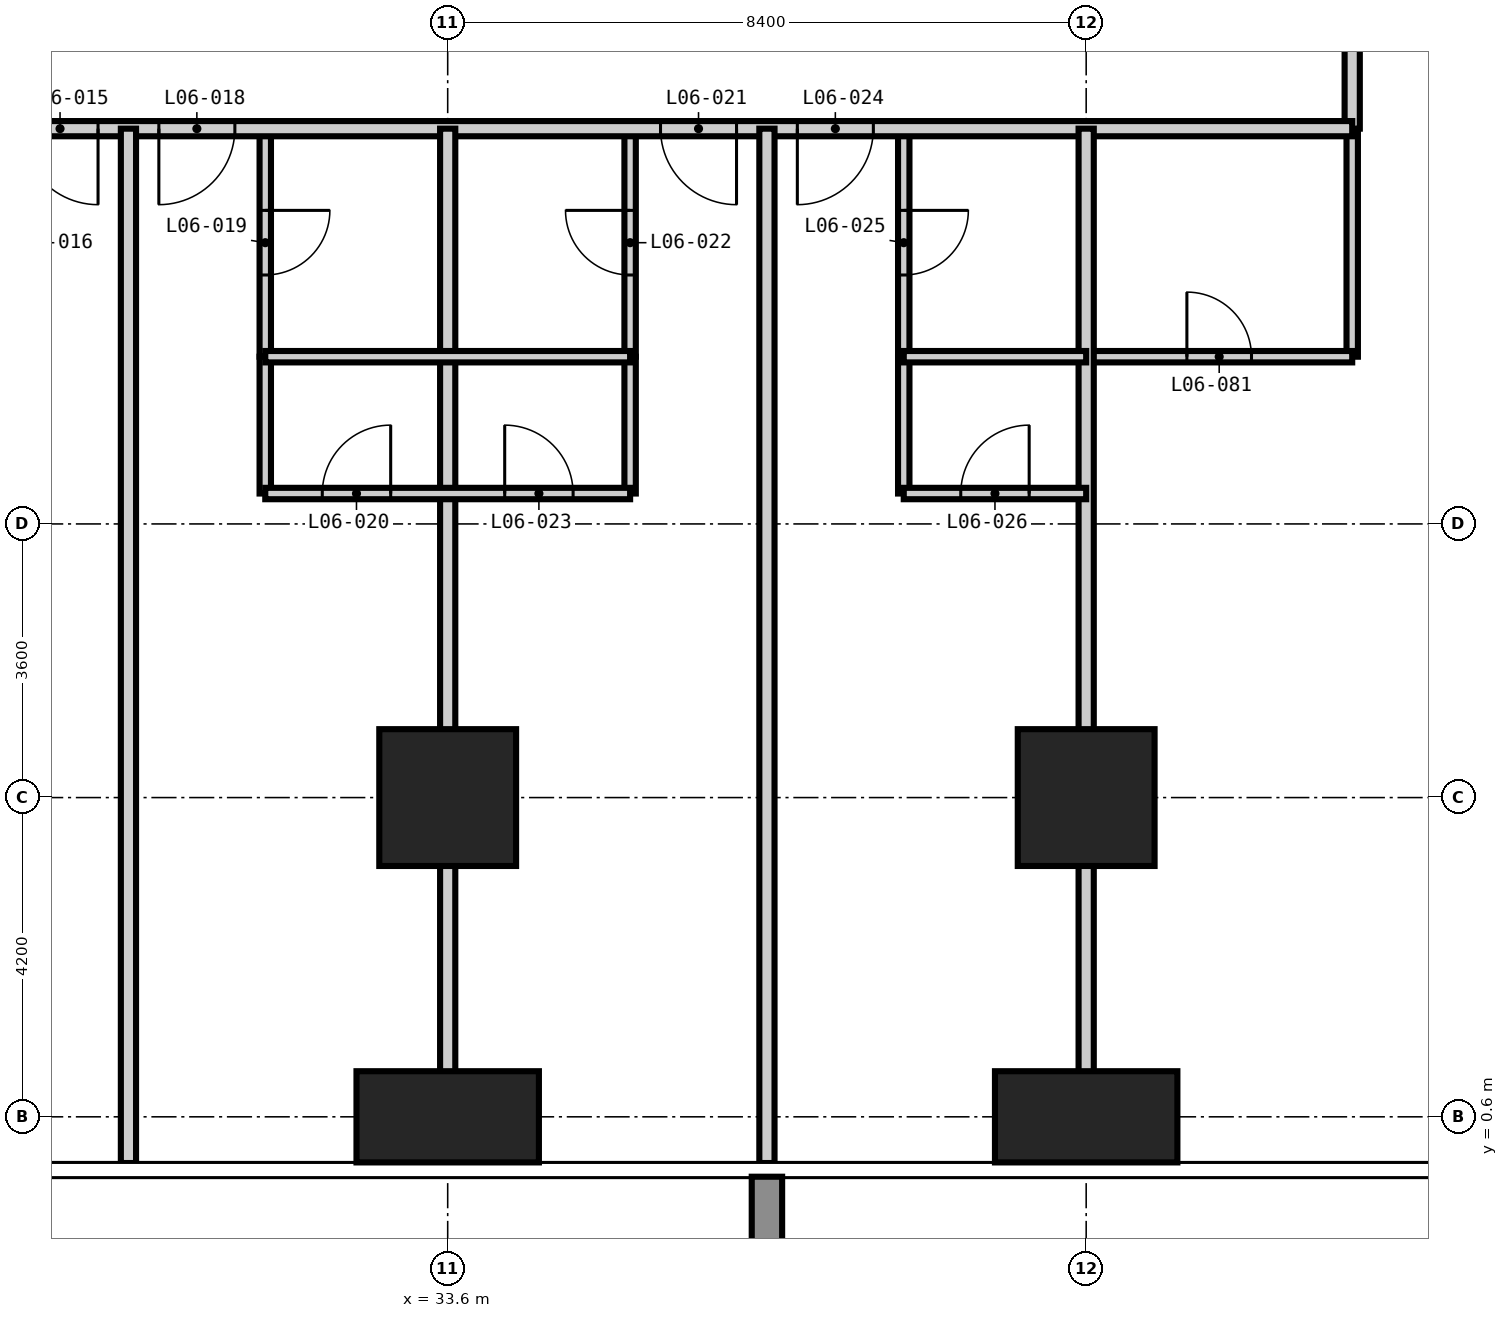
"""IFC4 building model, lengths in metres.
Left out: names, types, materials, properties, quantities, classifications, styles, units other than length and angle.
Written with IfcOpenShell. Run it as: python <this file> out.ifc"""

import sys

from ifc_helpers import new_model, si_unit, direction, frame, frame_2d, origin, origin_2d, place, context, subcontext, project, spatial, rectangle, extrude, element, fill, save


model = new_model("IFC4")
c1 = context("Model", 3, precision=1e-05, world=origin(), true_north=direction((0.0, 1.0)))
c2 = subcontext(c1, "Body", "Model", "MODEL_VIEW")
j1 = project(units=[si_unit("LENGTHUNIT", "METRE"), si_unit("PLANEANGLEUNIT", "RADIAN")], contexts=[c1])
p1 = place(None, origin())
s1 = spatial("IfcSite", under=j1, at=p1, CompositionType="ELEMENT")
p2 = place(p1, origin())
s2 = spatial("IfcBuilding", under=s1, at=p2, CompositionType="ELEMENT")
p3 = place(p2, frame((0.0, 0.0, 30.6)))
s3 = spatial("IfcBuildingStorey", under=s2, at=p3, CompositionType="ELEMENT", Elevation=30.6)
p4 = place(p3, frame((33.6, 0.6, -0.35), z_axis=(0.0, 0.0, 1.0), x_axis=(1.0, 0.0, 0.0)))
e1 = element("IfcColumn", 1, at=p4, inside=s3, PredefinedType="COLUMN", context=c2, shape_type="SweptSolid", body=[
    extrude(rectangle(XDim=2.4, YDim=1.2, at=origin_2d()), origin(), (0.0, 0.0, 1.0), 3.6),
])
p5 = place(p3, frame((33.6, 4.8, -0.35), z_axis=(0.0, 0.0, 1.0), x_axis=(1.0, 0.0, 0.0)))
e2 = element("IfcColumn", 2, at=p5, inside=s3, PredefinedType="COLUMN", context=c2, shape_type="SweptSolid", body=[
    extrude(rectangle(XDim=1.8, YDim=1.8, at=origin_2d()), origin(), (0.0, 0.0, 1.0), 3.6),
])
p6 = place(p3, frame((42.0, 0.6, -0.35), z_axis=(0.0, 0.0, 1.0), x_axis=(1.0, 0.0, 0.0)))
e3 = element("IfcColumn", 3, at=p6, inside=s3, PredefinedType="COLUMN", context=c2, shape_type="SweptSolid", body=[
    extrude(rectangle(XDim=2.4, YDim=1.2, at=origin_2d()), origin(), (0.0, 0.0, 1.0), 3.6),
])
p7 = place(p3, frame((42.0, 4.8, -0.35), z_axis=(0.0, 0.0, 1.0), x_axis=(1.0, 0.0, 0.0)))
e4 = element("IfcColumn", 4, at=p7, inside=s3, PredefinedType="COLUMN", context=c2, shape_type="SweptSolid", body=[
    extrude(rectangle(XDim=1.8, YDim=1.8, at=origin_2d()), origin(), (0.0, 0.0, 1.0), 3.6),
])
p8 = place(p3, frame((31.2, 10.6, 0.0), z_axis=(0.0, 0.0, 1.0), x_axis=(0.0, 1.0, 0.0)))
e5 = element("IfcWall", 5, at=p8, inside=s3, PredefinedType="PARTITIONING", context=c2, shape_type="SweptSolid", body=[
    extrude(rectangle(XDim=3.0, YDim=0.15, at=frame_2d((1.5, 0.0))), origin(), (0.0, 0.0, 1.0), 3.25),
])
p9 = place(p8, frame((1.075, 0.0, 0.0)))
e6 = element("IfcOpeningElement", 6, at=p9, cuts=e5, PredefinedType="OPENING", context=c2, shape_type="SweptSolid", body=[
    extrude(rectangle(XDim=0.85, YDim=2.1, at=frame_2d((0.425, 1.05))), frame((0.0, 0.085, 0.0), z_axis=(0.0, -1.0, 0.0), x_axis=(1.0, 0.0, 0.0)), (0.0, 0.0, 1.0), 0.17),
])
p10 = place(p3, frame((36.0, 10.6, 0.0), z_axis=(0.0, 0.0, 1.0), x_axis=(0.0, 1.0, 0.0)))
e7 = element("IfcWall", 7, at=p10, inside=s3, PredefinedType="PARTITIONING", context=c2, shape_type="SweptSolid", body=[
    extrude(rectangle(XDim=3.0, YDim=0.15, at=frame_2d((1.5, 0.0))), origin(), (0.0, 0.0, 1.0), 3.25),
])
p11 = place(p10, frame((1.075, 0.0, 0.0)))
e8 = element("IfcOpeningElement", 8, at=p11, cuts=e7, PredefinedType="OPENING", context=c2, shape_type="SweptSolid", body=[
    extrude(rectangle(XDim=0.85, YDim=2.1, at=frame_2d((0.425, 1.05))), frame((0.0, 0.085, 0.0), z_axis=(0.0, -1.0, 0.0), x_axis=(1.0, 0.0, 0.0)), (0.0, 0.0, 1.0), 0.17),
])
p12 = place(p3, frame((39.6, 10.6, 0.0), z_axis=(0.0, 0.0, 1.0), x_axis=(0.0, 1.0, 0.0)))
e9 = element("IfcWall", 9, at=p12, inside=s3, PredefinedType="PARTITIONING", context=c2, shape_type="SweptSolid", body=[
    extrude(rectangle(XDim=3.0, YDim=0.15, at=frame_2d((1.5, 0.0))), origin(), (0.0, 0.0, 1.0), 3.25),
])
p13 = place(p12, frame((1.075, 0.0, 0.0)))
e10 = element("IfcOpeningElement", 10, at=p13, cuts=e9, PredefinedType="OPENING", context=c2, shape_type="SweptSolid", body=[
    extrude(rectangle(XDim=0.85, YDim=2.1, at=frame_2d((0.425, 1.05))), frame((0.0, 0.085, 0.0), z_axis=(0.0, -1.0, 0.0), x_axis=(1.0, 0.0, 0.0)), (0.0, 0.0, 1.0), 0.17),
])
p14 = place(p3, frame((45.5, 10.6, 0.0), z_axis=(0.0, 0.0, 1.0), x_axis=(0.0, 1.0, 0.0)))
e11 = element("IfcWall", 11, at=p14, inside=s3, PredefinedType="PARTITIONING", context=c2, shape_type="SweptSolid", body=[
    extrude(rectangle(XDim=3.0, YDim=0.15, at=frame_2d((1.5, 0.0))), origin(), (0.0, 0.0, 1.0), 3.25),
])
p15 = place(p3, frame((42.0, 10.6, 0.0), z_axis=(0.0, 0.0, 1.0), x_axis=(1.0, 0.0, 0.0)))
e12 = element("IfcWall", 12, at=p15, inside=s3, PredefinedType="PARTITIONING", context=c2, shape_type="SweptSolid", body=[
    extrude(rectangle(XDim=3.5, YDim=0.15, at=frame_2d((1.75, 0.0))), origin(), (0.0, 0.0, 1.0), 3.25),
])
p16 = place(p15, frame((1.325, 0.0, 0.0)))
e13 = element("IfcOpeningElement", 13, at=p16, cuts=e12, PredefinedType="OPENING", context=c2, shape_type="SweptSolid", body=[
    extrude(rectangle(XDim=0.85, YDim=2.1, at=frame_2d((0.425, 1.05))), frame((0.0, 0.085, 0.0), z_axis=(0.0, -1.0, 0.0), x_axis=(1.0, 0.0, 0.0)), (0.0, 0.0, 1.0), 0.17),
])
p17 = place(p3, frame((45.5, 45.8, 0.0), z_axis=(0.0, 0.0, 1.0), x_axis=(0.0, -1.0, 0.0)))
e14 = element("IfcWall", 14, at=p17, inside=s3, PredefinedType="PARTITIONING", context=c2, shape_type="SweptSolid", body=[
    extrude(rectangle(XDim=32.2, YDim=0.2, at=frame_2d((16.1, 0.0))), origin(), (0.0, 0.0, 1.0), 3.25),
])
p18 = place(p17, frame((26.4, 0.0, 0.0)))
e15 = element("IfcOpeningElement", 15, at=p18, cuts=e14, PredefinedType="OPENING", context=c2, shape_type="SweptSolid", body=[
    extrude(rectangle(XDim=1.0, YDim=2.2, at=frame_2d((0.5, 1.1))), frame((0.0, 0.11, 0.0), z_axis=(0.0, -1.0, 0.0), x_axis=(1.0, 0.0, 0.0)), (0.0, 0.0, 1.0), 0.22),
])
p19 = place(p17, frame((22.2, 0.0, 0.0)))
e16 = element("IfcOpeningElement", 16, at=p19, cuts=e14, PredefinedType="OPENING", context=c2, shape_type="SweptSolid", body=[
    extrude(rectangle(XDim=1.0, YDim=2.2, at=frame_2d((0.5, 1.1))), frame((0.0, 0.11, 0.0), z_axis=(0.0, -1.0, 0.0), x_axis=(1.0, 0.0, 0.0)), (0.0, 0.0, 1.0), 0.22),
])
p20 = place(p17, frame((16.8, 0.0, 0.0)))
e17 = element("IfcOpeningElement", 17, at=p20, cuts=e14, PredefinedType="OPENING", context=c2, shape_type="SweptSolid", body=[
    extrude(rectangle(XDim=1.0, YDim=2.2, at=frame_2d((0.5, 1.1))), frame((0.0, 0.11, 0.0), z_axis=(0.0, -1.0, 0.0), x_axis=(1.0, 0.0, 0.0)), (0.0, 0.0, 1.0), 0.22),
])
p21 = place(p17, frame((15.0, 0.0, 0.0)))
e18 = element("IfcOpeningElement", 18, at=p21, cuts=e14, PredefinedType="OPENING", context=c2, shape_type="SweptSolid", body=[
    extrude(rectangle(XDim=1.0, YDim=2.2, at=frame_2d((0.5, 1.1))), frame((0.0, 0.11, 0.0), z_axis=(0.0, -1.0, 0.0), x_axis=(1.0, 0.0, 0.0)), (0.0, 0.0, 1.0), 0.22),
])
p22 = place(p17, frame((8.4, 0.0, 0.0)))
e19 = element("IfcOpeningElement", 19, at=p22, cuts=e14, PredefinedType="OPENING", context=c2, shape_type="SweptSolid", body=[
    extrude(rectangle(XDim=1.0, YDim=2.2, at=frame_2d((0.5, 1.1))), frame((0.0, 0.11, 0.0), z_axis=(0.0, -1.0, 0.0), x_axis=(1.0, 0.0, 0.0)), (0.0, 0.0, 1.0), 0.22),
])
p23 = place(p17, frame((6.6, 0.0, 0.0)))
e20 = element("IfcOpeningElement", 20, at=p23, cuts=e14, PredefinedType="OPENING", context=c2, shape_type="SweptSolid", body=[
    extrude(rectangle(XDim=1.0, YDim=2.2, at=frame_2d((0.5, 1.1))), frame((0.0, 0.11, 0.0), z_axis=(0.0, -1.0, 0.0), x_axis=(1.0, 0.0, 0.0)), (0.0, 0.0, 1.0), 0.22),
])
p24 = place(p17, frame((30.1, 0.0, 0.0)))
e21 = element("IfcOpeningElement", 21, at=p24, cuts=e14, PredefinedType="OPENING", context=c2, shape_type="SweptSolid", body=[
    extrude(rectangle(XDim=1.0, YDim=2.2, at=frame_2d((0.5, 1.1))), frame((0.0, 0.11, 0.0), z_axis=(0.0, -1.0, 0.0), x_axis=(1.0, 0.0, 0.0)), (0.0, 0.0, 1.0), 0.22),
])
p25 = place(p17, frame((1.4, 0.0, 0.0)))
e22 = element("IfcOpeningElement", 22, at=p25, cuts=e14, PredefinedType="OPENING", context=c2, shape_type="SweptSolid", body=[
    extrude(rectangle(XDim=1.0, YDim=2.2, at=frame_2d((0.5, 1.1))), frame((0.0, 0.11, 0.0), z_axis=(0.0, -1.0, 0.0), x_axis=(1.0, 0.0, 0.0)), (0.0, 0.0, 1.0), 0.22),
])
p26 = place(p3, frame((45.5, 13.6, 0.0), z_axis=(0.0, 0.0, 1.0), x_axis=(-1.0, 0.0, 0.0)))
e23 = element("IfcWall", 23, at=p26, inside=s3, PredefinedType="PARTITIONING", context=c2, shape_type="SweptSolid", body=[
    extrude(rectangle(XDim=31.9, YDim=0.2, at=frame_2d((15.95, 0.0))), origin(), (0.0, 0.0, 1.0), 3.25),
])
p27 = place(p26, frame((24.9, 0.0, 0.0)))
e24 = element("IfcOpeningElement", 24, at=p27, cuts=e23, PredefinedType="OPENING", context=c2, shape_type="SweptSolid", body=[
    extrude(rectangle(XDim=1.0, YDim=2.2, at=frame_2d((0.5, 1.1))), frame((0.0, 0.11, 0.0), z_axis=(0.0, -1.0, 0.0), x_axis=(1.0, 0.0, 0.0)), (0.0, 0.0, 1.0), 0.22),
])
p28 = place(p26, frame((23.1, 0.0, 0.0)))
e25 = element("IfcOpeningElement", 25, at=p28, cuts=e23, PredefinedType="OPENING", context=c2, shape_type="SweptSolid", body=[
    extrude(rectangle(XDim=1.0, YDim=2.2, at=frame_2d((0.5, 1.1))), frame((0.0, 0.11, 0.0), z_axis=(0.0, -1.0, 0.0), x_axis=(1.0, 0.0, 0.0)), (0.0, 0.0, 1.0), 0.22),
])
p29 = place(p26, frame((16.5, 0.0, 0.0)))
e26 = element("IfcOpeningElement", 26, at=p29, cuts=e23, PredefinedType="OPENING", context=c2, shape_type="SweptSolid", body=[
    extrude(rectangle(XDim=1.0, YDim=2.2, at=frame_2d((0.5, 1.1))), frame((0.0, 0.11, 0.0), z_axis=(0.0, -1.0, 0.0), x_axis=(1.0, 0.0, 0.0)), (0.0, 0.0, 1.0), 0.22),
])
p30 = place(p26, frame((14.7, 0.0, 0.0)))
e27 = element("IfcOpeningElement", 27, at=p30, cuts=e23, PredefinedType="OPENING", context=c2, shape_type="SweptSolid", body=[
    extrude(rectangle(XDim=1.0, YDim=2.2, at=frame_2d((0.5, 1.1))), frame((0.0, 0.11, 0.0), z_axis=(0.0, -1.0, 0.0), x_axis=(1.0, 0.0, 0.0)), (0.0, 0.0, 1.0), 0.22),
])
p31 = place(p26, frame((8.1, 0.0, 0.0)))
e28 = element("IfcOpeningElement", 28, at=p31, cuts=e23, PredefinedType="OPENING", context=c2, shape_type="SweptSolid", body=[
    extrude(rectangle(XDim=1.0, YDim=2.2, at=frame_2d((0.5, 1.1))), frame((0.0, 0.11, 0.0), z_axis=(0.0, -1.0, 0.0), x_axis=(1.0, 0.0, 0.0)), (0.0, 0.0, 1.0), 0.22),
])
p32 = place(p26, frame((6.3, 0.0, 0.0)))
e29 = element("IfcOpeningElement", 29, at=p32, cuts=e23, PredefinedType="OPENING", context=c2, shape_type="SweptSolid", body=[
    extrude(rectangle(XDim=1.0, YDim=2.2, at=frame_2d((0.5, 1.1))), frame((0.0, 0.11, 0.0), z_axis=(0.0, -1.0, 0.0), x_axis=(1.0, 0.0, 0.0)), (0.0, 0.0, 1.0), 0.22),
])
for number, where, z_axis, x_axis in (
    (30, (29.4, -0.008, 0.0), (0.0, 0.0, 1.0), (0.0, 1.0, 0.0)),
    (31, (33.6, -0.008, 0.0), (0.0, 0.0, 1.0), (0.0, 1.0, 0.0)),
    (32, (37.8, -0.008, 0.0), (0.0, 0.0, 1.0), (0.0, 1.0, 0.0)),
    (33, (42.0, -0.008, 0.0), (0.0, 0.0, 1.0), (0.0, 1.0, 0.0)),
):
    element("IfcWall", number, at=place(p3, frame(where, z_axis=z_axis, x_axis=x_axis)), inside=s3, PredefinedType="PARTITIONING", context=c2, shape_type="SweptSolid", body=[
        extrude(rectangle(XDim=13.608, YDim=0.2, at=frame_2d((6.804, 0.0))), origin(), (0.0, 0.0, 1.0), 3.25),
    ])
for number, where, z_axis, x_axis in (
    (34, (31.2, 8.8, 0.0), (0.0, 0.0, 1.0), (0.0, 1.0, 0.0)),
    (35, (36.0, 8.8, 0.0), (0.0, 0.0, 1.0), (0.0, 1.0, 0.0)),
    (36, (39.6, 8.8, 0.0), (0.0, 0.0, 1.0), (0.0, 1.0, 0.0)),
):
    element("IfcWall", number, at=place(p3, frame(where, z_axis=z_axis, x_axis=x_axis)), inside=s3, PredefinedType="PARTITIONING", context=c2, shape_type="SweptSolid", body=[
        extrude(rectangle(XDim=1.8, YDim=0.15, at=frame_2d((0.9, 0.0))), origin(), (0.0, 0.0, 1.0), 3.25),
    ])
p33 = place(p3, frame((31.2, 8.8, 0.0), z_axis=(0.0, 0.0, 1.0), x_axis=(1.0, 0.0, 0.0)))
e37 = element("IfcWall", 37, at=p33, inside=s3, PredefinedType="PARTITIONING", context=c2, shape_type="SweptSolid", body=[
    extrude(rectangle(XDim=4.8, YDim=0.15, at=frame_2d((2.4, 0.0))), origin(), (0.0, 0.0, 1.0), 3.25),
])
p34 = place(p33, frame((0.75, 0.0, 0.0)))
e38 = element("IfcOpeningElement", 38, at=p34, cuts=e37, PredefinedType="OPENING", context=c2, shape_type="SweptSolid", body=[
    extrude(rectangle(XDim=0.9, YDim=2.1, at=frame_2d((0.45, 1.05))), frame((0.0, 0.085, 0.0), z_axis=(0.0, -1.0, 0.0), x_axis=(1.0, 0.0, 0.0)), (0.0, 0.0, 1.0), 0.17),
])
p35 = place(p33, frame((3.15, 0.0, 0.0)))
e39 = element("IfcOpeningElement", 39, at=p35, cuts=e37, PredefinedType="OPENING", context=c2, shape_type="SweptSolid", body=[
    extrude(rectangle(XDim=0.9, YDim=2.1, at=frame_2d((0.45, 1.05))), frame((0.0, 0.085, 0.0), z_axis=(0.0, -1.0, 0.0), x_axis=(1.0, 0.0, 0.0)), (0.0, 0.0, 1.0), 0.17),
])
p36 = place(p3, frame((39.6, 8.8, 0.0), z_axis=(0.0, 0.0, 1.0), x_axis=(1.0, 0.0, 0.0)))
e40 = element("IfcWall", 40, at=p36, inside=s3, PredefinedType="PARTITIONING", context=c2, shape_type="SweptSolid", body=[
    extrude(rectangle(XDim=2.4, YDim=0.15, at=frame_2d((1.2, 0.0))), origin(), (0.0, 0.0, 1.0), 3.25),
])
p37 = place(p36, frame((0.75, 0.0, 0.0)))
e41 = element("IfcOpeningElement", 41, at=p37, cuts=e40, PredefinedType="OPENING", context=c2, shape_type="SweptSolid", body=[
    extrude(rectangle(XDim=0.9, YDim=2.1, at=frame_2d((0.45, 1.05))), frame((0.0, 0.085, 0.0), z_axis=(0.0, -1.0, 0.0), x_axis=(1.0, 0.0, 0.0)), (0.0, 0.0, 1.0), 0.17),
])
p38 = place(p3, frame((31.2, 10.6, 0.0), z_axis=(0.0, 0.0, 1.0), x_axis=(1.0, 0.0, 0.0)))
e42 = element("IfcWall", 42, at=p38, inside=s3, PredefinedType="PARTITIONING", context=c2, shape_type="SweptSolid", body=[
    extrude(rectangle(XDim=4.8, YDim=0.15, at=frame_2d((2.4, 0.0))), origin(), (0.0, 0.0, 1.0), 3.25),
])
p39 = place(p3, frame((39.6, 10.6, 0.0), z_axis=(0.0, 0.0, 1.0), x_axis=(1.0, 0.0, 0.0)))
e43 = element("IfcWall", 43, at=p39, inside=s3, PredefinedType="PARTITIONING", context=c2, shape_type="SweptSolid", body=[
    extrude(rectangle(XDim=2.4, YDim=0.15, at=frame_2d((1.2, 0.0))), origin(), (0.0, 0.0, 1.0), 3.25),
])
p40 = place(p29, origin())
e44 = element("IfcDoor", 44, at=p40, inside=s3, OperationType="SINGLE_SWING_LEFT", PredefinedType="DOOR", context=c2, shape_type="SweptSolid", body=[
    extrude(rectangle(XDim=1.0, YDim=2.2, at=frame_2d((0.5, 1.1))), frame((0.0, 0.025, 0.0), z_axis=(0.0, -1.0, 0.0), x_axis=(1.0, 0.0, 0.0)), (0.0, 0.0, 1.0), 0.05),
])
fill(e26, e44)
p41 = place(p30, origin())
e45 = element("IfcDoor", 45, at=p41, inside=s3, OperationType="SINGLE_SWING_RIGHT", PredefinedType="DOOR", context=c2, shape_type="SweptSolid", body=[
    extrude(rectangle(XDim=1.0, YDim=2.2, at=frame_2d((0.5, 1.1))), frame((0.0, 0.025, 0.0), z_axis=(0.0, -1.0, 0.0), x_axis=(1.0, 0.0, 0.0)), (0.0, 0.0, 1.0), 0.05),
])
fill(e27, e45)
p42 = place(p9, frame((0.85, 0.0, 0.0), z_axis=(0.0, 0.0, 1.0), x_axis=(-1.0, 0.0, 0.0)))
e46 = element("IfcDoor", 46, at=p42, inside=s3, OperationType="SINGLE_SWING_LEFT", PredefinedType="DOOR", context=c2, shape_type="SweptSolid", body=[
    extrude(rectangle(XDim=0.85, YDim=2.1, at=frame_2d((0.425, 1.05))), frame((0.0, 0.025, 0.0), z_axis=(0.0, -1.0, 0.0), x_axis=(1.0, 0.0, 0.0)), (0.0, 0.0, 1.0), 0.05),
])
fill(e6, e46)
p43 = place(p34, origin())
e47 = element("IfcDoor", 47, at=p43, inside=s3, OperationType="SINGLE_SWING_RIGHT", PredefinedType="DOOR", context=c2, shape_type="SweptSolid", body=[
    extrude(rectangle(XDim=0.9, YDim=2.1, at=frame_2d((0.45, 1.05))), frame((0.0, 0.025, 0.0), z_axis=(0.0, -1.0, 0.0), x_axis=(1.0, 0.0, 0.0)), (0.0, 0.0, 1.0), 0.05),
])
fill(e38, e47)
p44 = place(p31, origin())
e48 = element("IfcDoor", 48, at=p44, inside=s3, OperationType="SINGLE_SWING_LEFT", PredefinedType="DOOR", context=c2, shape_type="SweptSolid", body=[
    extrude(rectangle(XDim=1.0, YDim=2.2, at=frame_2d((0.5, 1.1))), frame((0.0, 0.025, 0.0), z_axis=(0.0, -1.0, 0.0), x_axis=(1.0, 0.0, 0.0)), (0.0, 0.0, 1.0), 0.05),
])
fill(e28, e48)
p45 = place(p11, origin())
e49 = element("IfcDoor", 49, at=p45, inside=s3, OperationType="SINGLE_SWING_RIGHT", PredefinedType="DOOR", context=c2, shape_type="SweptSolid", body=[
    extrude(rectangle(XDim=0.85, YDim=2.1, at=frame_2d((0.425, 1.05))), frame((0.0, 0.025, 0.0), z_axis=(0.0, -1.0, 0.0), x_axis=(1.0, 0.0, 0.0)), (0.0, 0.0, 1.0), 0.05),
])
fill(e8, e49)
p46 = place(p35, origin())
e50 = element("IfcDoor", 50, at=p46, inside=s3, OperationType="SINGLE_SWING_LEFT", PredefinedType="DOOR", context=c2, shape_type="SweptSolid", body=[
    extrude(rectangle(XDim=0.9, YDim=2.1, at=frame_2d((0.45, 1.05))), frame((0.0, 0.025, 0.0), z_axis=(0.0, -1.0, 0.0), x_axis=(1.0, 0.0, 0.0)), (0.0, 0.0, 1.0), 0.05),
])
fill(e39, e50)
p47 = place(p32, origin())
e51 = element("IfcDoor", 51, at=p47, inside=s3, OperationType="SINGLE_SWING_RIGHT", PredefinedType="DOOR", context=c2, shape_type="SweptSolid", body=[
    extrude(rectangle(XDim=1.0, YDim=2.2, at=frame_2d((0.5, 1.1))), frame((0.0, 0.025, 0.0), z_axis=(0.0, -1.0, 0.0), x_axis=(1.0, 0.0, 0.0)), (0.0, 0.0, 1.0), 0.05),
])
fill(e29, e51)
p48 = place(p13, frame((0.85, 0.0, 0.0), z_axis=(0.0, 0.0, 1.0), x_axis=(-1.0, 0.0, 0.0)))
e52 = element("IfcDoor", 52, at=p48, inside=s3, OperationType="SINGLE_SWING_LEFT", PredefinedType="DOOR", context=c2, shape_type="SweptSolid", body=[
    extrude(rectangle(XDim=0.85, YDim=2.1, at=frame_2d((0.425, 1.05))), frame((0.0, 0.025, 0.0), z_axis=(0.0, -1.0, 0.0), x_axis=(1.0, 0.0, 0.0)), (0.0, 0.0, 1.0), 0.05),
])
fill(e10, e52)
p49 = place(p37, origin())
e53 = element("IfcDoor", 53, at=p49, inside=s3, OperationType="SINGLE_SWING_RIGHT", PredefinedType="DOOR", context=c2, shape_type="SweptSolid", body=[
    extrude(rectangle(XDim=0.9, YDim=2.1, at=frame_2d((0.45, 1.05))), frame((0.0, 0.025, 0.0), z_axis=(0.0, -1.0, 0.0), x_axis=(1.0, 0.0, 0.0)), (0.0, 0.0, 1.0), 0.05),
])
fill(e41, e53)
p50 = place(p16, origin())
e54 = element("IfcDoor", 54, at=p50, inside=s3, OperationType="SINGLE_SWING_LEFT", PredefinedType="DOOR", context=c2, shape_type="SweptSolid", body=[
    extrude(rectangle(XDim=0.85, YDim=2.1, at=frame_2d((0.425, 1.05))), frame((0.0, 0.025, 0.0), z_axis=(0.0, -1.0, 0.0), x_axis=(1.0, 0.0, 0.0)), (0.0, 0.0, 1.0), 0.05),
])
fill(e13, e54)
save(model, sys.argv[1])
